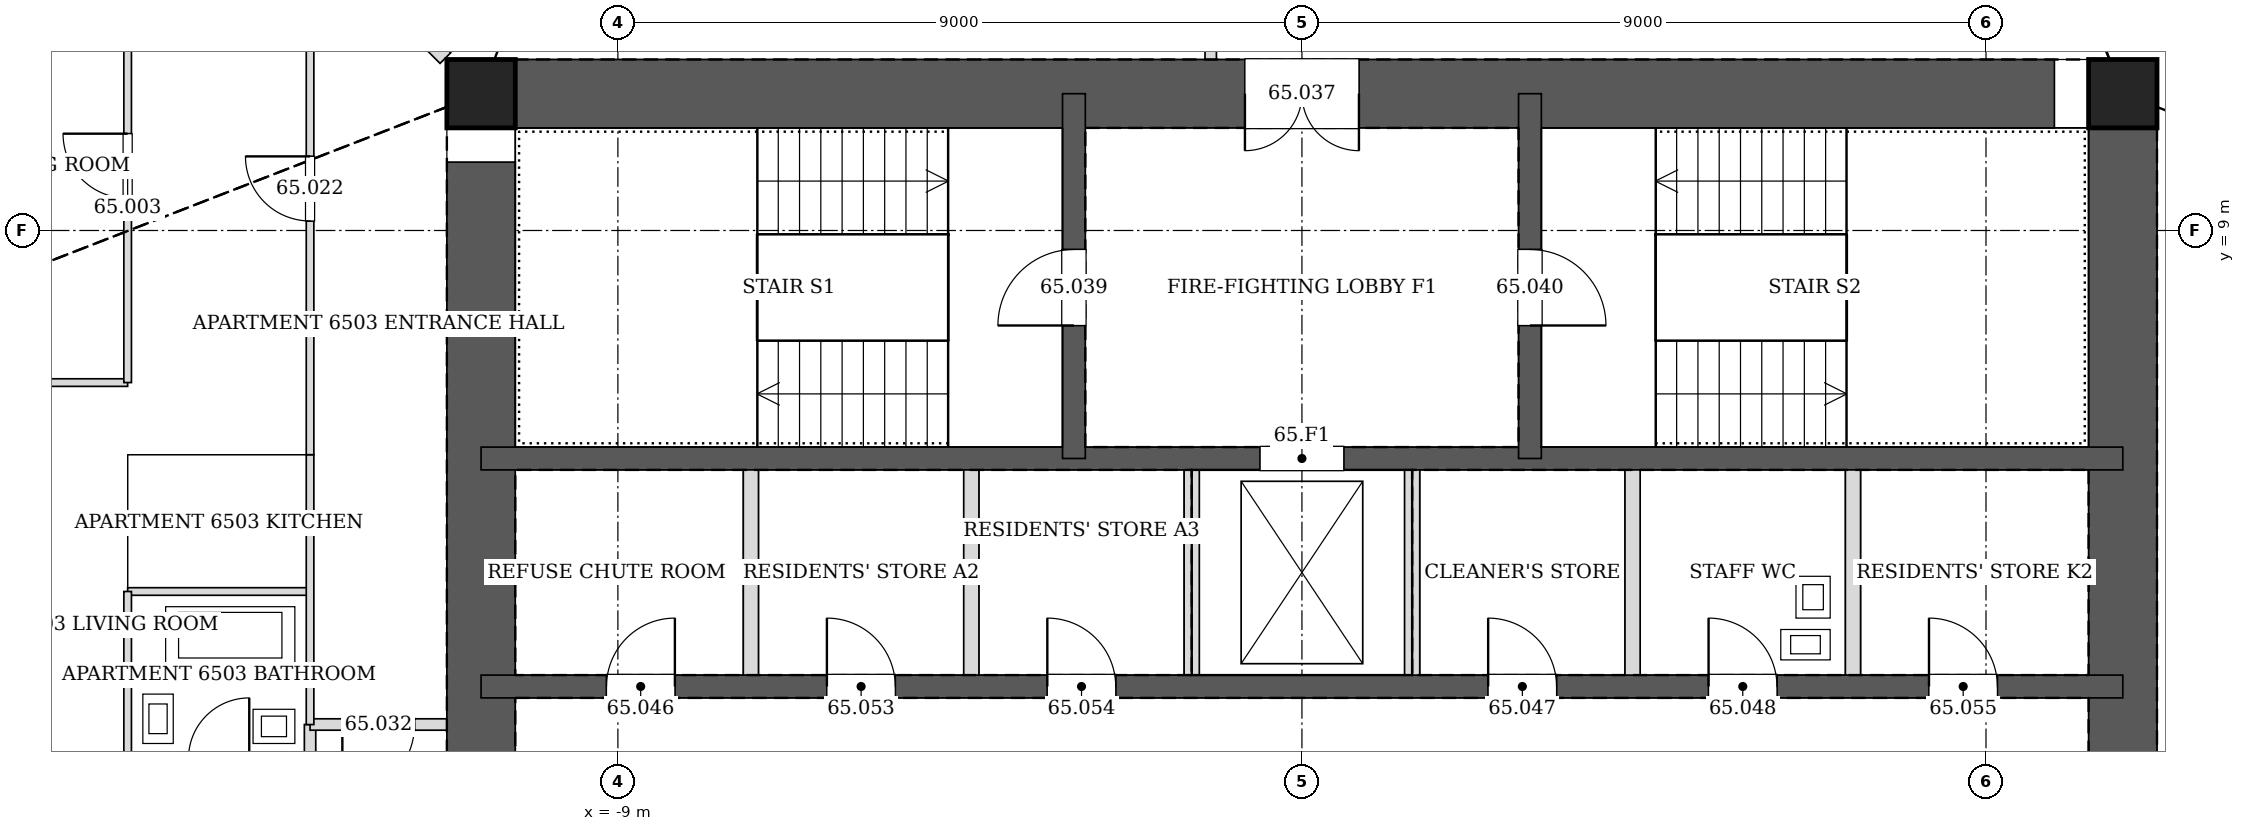
"""IFC4 building model, lengths in metres.
Left out: names, types, materials, properties, quantities, classifications, styles, units other than length and angle.
Written with IfcOpenShell. Run it as: python <this file> out.ifc"""

import sys

from ifc_helpers import new_model, si_unit, direction, frame, frame_2d, origin, origin_2d, place, context, subcontext, project, spatial, rectangle, hollow_rectangle, extrude, element, fill, save


model = new_model("IFC4")
c1 = context("Model", 3, precision=1e-05, world=origin(), true_north=direction((0.0, 1.0)))
c2 = subcontext(c1, "Body", "Model", "MODEL_VIEW")
j1 = project(units=[si_unit("LENGTHUNIT", "METRE"), si_unit("PLANEANGLEUNIT", "RADIAN")], contexts=[c1])
p1 = place(None, origin())
s1 = spatial("IfcSite", under=j1, at=p1, CompositionType="ELEMENT")
p2 = place(p1, origin())
s2 = spatial("IfcBuilding", under=s1, at=p2, CompositionType="ELEMENT")
p3 = place(p2, frame((0.0, 0.0, 270.8)))
s3 = spatial("IfcBuildingStorey", under=s2, at=p3, CompositionType="ELEMENT", Elevation=270.8)
for number, where, z_axis, x_axis in (
    (1, (10.8, 10.8, 0.0), (0.0, 0.0, 1.0), (1.0, 0.0, 0.0)),
    (2, (-10.8, 10.8, 0.0), (0.0, 0.0, 1.0), (1.0, 0.0, 0.0)),
):
    element("IfcColumn", number, at=place(p3, frame(where, z_axis=z_axis, x_axis=x_axis)), inside=s3, PredefinedType="COLUMN", context=c2, shape_type="SweptSolid", body=[
        extrude(hollow_rectangle(XDim=0.9, YDim=0.9, WallThickness=0.04, at=origin_2d()), origin(), (0.0, 0.0, 1.0), 3.4),
    ])
p4 = place(p3, frame((10.8, -10.8, 0.0), z_axis=(0.0, 0.0, 1.0), x_axis=(0.0, 1.0, 0.0)))
e3 = element("IfcWall", 3, at=p4, inside=s3, PredefinedType="SOLIDWALL", context=c2, shape_type="SweptSolid", body=[
    extrude(rectangle(XDim=21.6, YDim=0.9, at=frame_2d((10.8, 0.0))), origin(), (0.0, 0.0, 1.0), 3.4),
])
p5 = place(p4, frame((11.7, 0.0, 0.0)))
e4 = element("IfcOpeningElement", 4, at=p5, cuts=e3, PredefinedType="OPENING", context=c2, shape_type="SweptSolid", body=[
    extrude(rectangle(XDim=1.2, YDim=2.1, at=frame_2d((0.6, 1.05))), frame((0.0, 0.46, 0.0), z_axis=(0.0, -1.0, 0.0), x_axis=(1.0, 0.0, 0.0)), (0.0, 0.0, 1.0), 0.92),
])
p6 = place(p4, frame((8.7, 0.0, 0.0)))
e5 = element("IfcOpeningElement", 5, at=p6, cuts=e3, PredefinedType="OPENING", context=c2, shape_type="SweptSolid", body=[
    extrude(rectangle(XDim=1.2, YDim=2.1, at=frame_2d((0.6, 1.05))), frame((0.0, 0.46, 0.0), z_axis=(0.0, -1.0, 0.0), x_axis=(1.0, 0.0, 0.0)), (0.0, 0.0, 1.0), 0.92),
])
p7 = place(p3, frame((10.8, 10.8, 0.0), z_axis=(0.0, 0.0, 1.0), x_axis=(-1.0, 0.0, 0.0)))
e6 = element("IfcWall", 6, at=p7, inside=s3, PredefinedType="SOLIDWALL", context=c2, shape_type="SweptSolid", body=[
    extrude(rectangle(XDim=21.6, YDim=0.9, at=frame_2d((10.8, 0.0))), origin(), (0.0, 0.0, 1.0), 3.4),
])
p8 = place(p7, frame((10.05, 0.0, 0.0)))
e7 = element("IfcOpeningElement", 7, at=p8, cuts=e6, PredefinedType="OPENING", context=c2, shape_type="SweptSolid", body=[
    extrude(rectangle(XDim=1.5, YDim=2.1, at=frame_2d((0.75, 1.05))), frame((0.0, 0.46, 0.0), z_axis=(0.0, -1.0, 0.0), x_axis=(1.0, 0.0, 0.0)), (0.0, 0.0, 1.0), 0.92),
])
p9 = place(p3, frame((-10.8, 10.8, 0.0), z_axis=(0.0, 0.0, 1.0), x_axis=(0.0, -1.0, 0.0)))
e8 = element("IfcWall", 8, at=p9, inside=s3, PredefinedType="SOLIDWALL", context=c2, shape_type="SweptSolid", body=[
    extrude(rectangle(XDim=21.6, YDim=0.9, at=frame_2d((10.8, 0.0))), origin(), (0.0, 0.0, 1.0), 3.4),
])
p10 = place(p9, frame((8.7, 0.0, 0.0)))
e9 = element("IfcOpeningElement", 9, at=p10, cuts=e8, PredefinedType="OPENING", context=c2, shape_type="SweptSolid", body=[
    extrude(rectangle(XDim=1.2, YDim=2.1, at=frame_2d((0.6, 1.05))), frame((0.0, 0.46, 0.0), z_axis=(0.0, -1.0, 0.0), x_axis=(1.0, 0.0, 0.0)), (0.0, 0.0, 1.0), 0.92),
])
p11 = place(p9, frame((11.7, 0.0, 0.0)))
e10 = element("IfcOpeningElement", 10, at=p11, cuts=e8, PredefinedType="OPENING", context=c2, shape_type="SweptSolid", body=[
    extrude(rectangle(XDim=1.2, YDim=2.1, at=frame_2d((0.6, 1.05))), frame((0.0, 0.46, 0.0), z_axis=(0.0, -1.0, 0.0), x_axis=(1.0, 0.0, 0.0)), (0.0, 0.0, 1.0), 0.92),
])
p12 = place(p3, frame((-10.8, 3.0, 0.0), z_axis=(0.0, 0.0, 1.0), x_axis=(1.0, 0.0, 0.0)))
e11 = element("IfcWall", 11, at=p12, inside=s3, PredefinedType="SOLIDWALL", context=c2, shape_type="SweptSolid", body=[
    extrude(rectangle(XDim=21.6, YDim=0.3, at=frame_2d((10.8, 0.0))), origin(), (0.0, 0.0, 1.0), 3.4),
])
p13 = place(p12, frame((1.65, 0.0, 0.0)))
e12 = element("IfcOpeningElement", 12, at=p13, cuts=e11, PredefinedType="OPENING", context=c2, shape_type="SweptSolid", body=[
    extrude(rectangle(XDim=0.9, YDim=2.1, at=frame_2d((0.45, 1.05))), frame((0.0, 0.16, 0.0), z_axis=(0.0, -1.0, 0.0), x_axis=(1.0, 0.0, 0.0)), (0.0, 0.0, 1.0), 0.32),
])
p14 = place(p12, frame((13.25, 0.0, 0.0)))
e13 = element("IfcOpeningElement", 13, at=p14, cuts=e11, PredefinedType="OPENING", context=c2, shape_type="SweptSolid", body=[
    extrude(rectangle(XDim=0.9, YDim=2.1, at=frame_2d((0.45, 1.05))), frame((0.0, 0.16, 0.0), z_axis=(0.0, -1.0, 0.0), x_axis=(1.0, 0.0, 0.0)), (0.0, 0.0, 1.0), 0.32),
])
p15 = place(p12, frame((16.15, 0.0, 0.0)))
e14 = element("IfcOpeningElement", 14, at=p15, cuts=e11, PredefinedType="OPENING", context=c2, shape_type="SweptSolid", body=[
    extrude(rectangle(XDim=0.9, YDim=2.1, at=frame_2d((0.45, 1.05))), frame((0.0, 0.16, 0.0), z_axis=(0.0, -1.0, 0.0), x_axis=(1.0, 0.0, 0.0)), (0.0, 0.0, 1.0), 0.32),
])
p16 = place(p12, frame((4.55, 0.0, 0.0)))
e15 = element("IfcOpeningElement", 15, at=p16, cuts=e11, PredefinedType="OPENING", context=c2, shape_type="SweptSolid", body=[
    extrude(rectangle(XDim=0.9, YDim=2.1, at=frame_2d((0.45, 1.05))), frame((0.0, 0.16, 0.0), z_axis=(0.0, -1.0, 0.0), x_axis=(1.0, 0.0, 0.0)), (0.0, 0.0, 1.0), 0.32),
])
p17 = place(p12, frame((7.45, 0.0, 0.0)))
e16 = element("IfcOpeningElement", 16, at=p17, cuts=e11, PredefinedType="OPENING", context=c2, shape_type="SweptSolid", body=[
    extrude(rectangle(XDim=0.9, YDim=2.1, at=frame_2d((0.45, 1.05))), frame((0.0, 0.16, 0.0), z_axis=(0.0, -1.0, 0.0), x_axis=(1.0, 0.0, 0.0)), (0.0, 0.0, 1.0), 0.32),
])
p18 = place(p12, frame((19.05, 0.0, 0.0)))
e17 = element("IfcOpeningElement", 17, at=p18, cuts=e11, PredefinedType="OPENING", context=c2, shape_type="SweptSolid", body=[
    extrude(rectangle(XDim=0.9, YDim=2.1, at=frame_2d((0.45, 1.05))), frame((0.0, 0.16, 0.0), z_axis=(0.0, -1.0, 0.0), x_axis=(1.0, 0.0, 0.0)), (0.0, 0.0, 1.0), 0.32),
])
p19 = place(p3, frame((-10.8, 6.0, 0.0), z_axis=(0.0, 0.0, 1.0), x_axis=(1.0, 0.0, 0.0)))
e18 = element("IfcWall", 18, at=p19, inside=s3, PredefinedType="SOLIDWALL", context=c2, shape_type="SweptSolid", body=[
    extrude(rectangle(XDim=21.6, YDim=0.3, at=frame_2d((10.8, 0.0))), origin(), (0.0, 0.0, 1.0), 3.4),
])
p20 = place(p19, frame((10.25, 0.0, 0.0)))
e19 = element("IfcOpeningElement", 19, at=p20, cuts=e18, PredefinedType="OPENING", context=c2, shape_type="SweptSolid", body=[
    extrude(rectangle(XDim=1.1, YDim=2.1, at=frame_2d((0.55, 1.05))), frame((0.0, 0.16, 0.0), z_axis=(0.0, -1.0, 0.0), x_axis=(1.0, 0.0, 0.0)), (0.0, 0.0, 1.0), 0.32),
])
p21 = place(p3, frame((-3.0, 6.0, 0.0), z_axis=(0.0, 0.0, 1.0), x_axis=(0.0, 1.0, 0.0)))
e20 = element("IfcWall", 20, at=p21, inside=s3, PredefinedType="SOLIDWALL", context=c2, shape_type="SweptSolid", body=[
    extrude(rectangle(XDim=4.8, YDim=0.3, at=frame_2d((2.4, 0.0))), origin(), (0.0, 0.0, 1.0), 3.4),
])
p22 = place(p21, frame((1.75, 0.0, 0.0)))
e21 = element("IfcOpeningElement", 21, at=p22, cuts=e20, PredefinedType="OPENING", context=c2, shape_type="SweptSolid", body=[
    extrude(rectangle(XDim=1.0, YDim=2.1, at=frame_2d((0.5, 1.05))), frame((0.0, 0.16, 0.0), z_axis=(0.0, -1.0, 0.0), x_axis=(1.0, 0.0, 0.0)), (0.0, 0.0, 1.0), 0.32),
])
p23 = place(p3, frame((3.0, 6.0, 0.0), z_axis=(0.0, 0.0, 1.0), x_axis=(0.0, 1.0, 0.0)))
e22 = element("IfcWall", 22, at=p23, inside=s3, PredefinedType="SOLIDWALL", context=c2, shape_type="SweptSolid", body=[
    extrude(rectangle(XDim=4.8, YDim=0.3, at=frame_2d((2.4, 0.0))), origin(), (0.0, 0.0, 1.0), 3.4),
])
p24 = place(p23, frame((1.75, 0.0, 0.0)))
e23 = element("IfcOpeningElement", 23, at=p24, cuts=e22, PredefinedType="OPENING", context=c2, shape_type="SweptSolid", body=[
    extrude(rectangle(XDim=1.0, YDim=2.1, at=frame_2d((0.5, 1.05))), frame((0.0, 0.16, 0.0), z_axis=(0.0, -1.0, 0.0), x_axis=(1.0, 0.0, 0.0)), (0.0, 0.0, 1.0), 0.32),
])
p25 = place(p3, frame((-1.2, 13.05, 0.0), z_axis=(0.0, 0.0, 1.0), x_axis=(0.0, -1.0, 0.0)))
e24 = element("IfcWall", 24, at=p25, inside=s3, PredefinedType="PARTITIONING", context=c2, shape_type="SweptSolid", body=[
    extrude(rectangle(XDim=1.8, YDim=0.15, at=frame_2d((0.9, 0.0))), origin(), (0.0, 0.0, 1.0), 3.2),
])
p26 = place(p25, frame((0.425, 0.0, 0.0)))
e25 = element("IfcOpeningElement", 25, at=p26, cuts=e24, PredefinedType="OPENING", context=c2, shape_type="SweptSolid", body=[
    extrude(rectangle(XDim=0.95, YDim=2.1, at=frame_2d((0.475, 1.05))), frame((0.0, 0.085, 0.0), z_axis=(0.0, -1.0, 0.0), x_axis=(1.0, 0.0, 0.0)), (0.0, 0.0, 1.0), 0.17),
])
p27 = place(p3, frame((-13.05, 2.5, 0.0), z_axis=(0.0, 0.0, 1.0), x_axis=(0.0, -1.0, 0.0)))
e26 = element("IfcWall", 26, at=p27, inside=s3, PredefinedType="PARTITIONING", context=c2, shape_type="SweptSolid", body=[
    extrude(rectangle(XDim=0.451, YDim=0.15, at=frame_2d((0.226, 0.0))), origin(), (0.0, 0.0, 1.0), 3.2),
])
p28 = place(p3, frame((-11.25, 2.5, 0.0), z_axis=(0.0, 0.0, 1.0), x_axis=(-1.0, 0.0, 0.0)))
e27 = element("IfcWall", 27, at=p28, inside=s3, PredefinedType="PARTITIONING", context=c2, shape_type="SweptSolid", body=[
    extrude(rectangle(XDim=1.8, YDim=0.15, at=frame_2d((0.9, 0.0))), origin(), (0.0, 0.0, 1.0), 3.2),
])
p29 = place(p28, frame((0.425, 0.0, 0.0)))
e28 = element("IfcOpeningElement", 28, at=p29, cuts=e27, PredefinedType="OPENING", context=c2, shape_type="SweptSolid", body=[
    extrude(rectangle(XDim=0.95, YDim=2.1, at=frame_2d((0.475, 1.05))), frame((0.0, 0.085, 0.0), z_axis=(0.0, -1.0, 0.0), x_axis=(1.0, 0.0, 0.0)), (0.0, 0.0, 1.0), 0.17),
])
p30 = place(p3, frame((-18.198, 6.999, 0.0), z_axis=(0.0, 0.0, 1.0), x_axis=(1.0, 0.0, 0.0)))
e29 = element("IfcWall", 29, at=p30, inside=s3, PredefinedType="PARTITIONING", context=c2, shape_type="SweptSolid", body=[
    extrude(rectangle(XDim=2.748, YDim=0.1, at=frame_2d((1.374, 0.0))), origin(), (0.0, 0.0, 1.0), 2.591),
])
p31 = place(p3, frame((-15.45, 6.999, 0.0), z_axis=(0.0, 0.0, 1.0), x_axis=(0.0, 1.0, 0.0)))
e30 = element("IfcWall", 30, at=p31, inside=s3, PredefinedType="PARTITIONING", context=c2, shape_type="SweptSolid", body=[
    extrude(rectangle(XDim=6.314, YDim=0.1, at=frame_2d((3.157, 0.0))), origin(), (0.0, 0.0, 1.0), 2.349),
])
p32 = place(p31, frame((2.425, 0.0, 0.0)))
e31 = element("IfcOpeningElement", 31, at=p32, cuts=e30, PredefinedType="OPENING", context=c2, shape_type="SweptSolid", body=[
    extrude(rectangle(XDim=0.85, YDim=2.1, at=frame_2d((0.425, 1.05))), frame((0.0, 0.06, 0.0), z_axis=(0.0, -1.0, 0.0), x_axis=(1.0, 0.0, 0.0)), (0.0, 0.0, 1.0), 0.12),
])
p33 = place(p3, frame((-13.586, 13.586, 0.0), z_axis=(0.0, 0.0, 1.0), x_axis=(0.707106781187, -0.707106781187, 0.0)))
e32 = element("IfcWall", 32, at=p33, inside=s3, PredefinedType="PARTITIONING", context=c2, shape_type="SweptSolid", body=[
    extrude(rectangle(XDim=3.277, YDim=0.2, at=frame_2d((1.638, 0.0))), origin(), (0.0, 0.0, 1.0), 2.591),
])
p34 = place(p3, frame((-15.45, 4.25, 0.0), z_axis=(0.0, 0.0, 1.0), x_axis=(1.0, 0.0, 0.0)))
e33 = element("IfcWall", 33, at=p34, inside=s3, PredefinedType="PARTITIONING", context=c2, shape_type="SweptSolid", body=[
    extrude(rectangle(XDim=2.4, YDim=0.1, at=frame_2d((1.2, 0.0))), origin(), (0.0, 0.0, 1.0), 2.591),
])
p35 = place(p3, frame((-13.05, 6.05, 0.0), z_axis=(0.0, 0.0, 1.0), x_axis=(0.0, -1.0, 0.0)))
e34 = element("IfcWall", 34, at=p35, inside=s3, PredefinedType="PARTITIONING", context=c2, shape_type="SweptSolid", body=[
    extrude(rectangle(XDim=3.551, YDim=0.1, at=frame_2d((1.775, 0.0))), origin(), (0.0, 0.0, 1.0), 3.2),
])
p36 = place(p3, frame((-15.45, 4.25, 0.0), z_axis=(0.0, 0.0, 1.0), x_axis=(0.0, -1.0, 0.0)))
e35 = element("IfcWall", 35, at=p36, inside=s3, PredefinedType="PARTITIONING", context=c2, shape_type="SweptSolid", body=[
    extrude(rectangle(XDim=2.2, YDim=0.1, at=frame_2d((1.1, 0.0))), origin(), (0.0, 0.0, 1.0), 3.2),
])
p37 = place(p3, frame((-13.05, 6.05, 0.0), z_axis=(0.0, 0.0, 1.0), x_axis=(0.0, 1.0, 0.0)))
e36 = element("IfcWall", 36, at=p37, inside=s3, PredefinedType="PARTITIONING", context=c2, shape_type="SweptSolid", body=[
    extrude(rectangle(XDim=7.0, YDim=0.1, at=frame_2d((3.5, 0.0))), origin(), (0.0, 0.0, 1.0), 2.349),
])
p38 = place(p37, frame((3.075, 0.0, 0.0)))
e37 = element("IfcOpeningElement", 37, at=p38, cuts=e36, PredefinedType="OPENING", context=c2, shape_type="SweptSolid", body=[
    extrude(rectangle(XDim=0.85, YDim=2.1, at=frame_2d((0.425, 1.05))), frame((0.0, 0.06, 0.0), z_axis=(0.0, -1.0, 0.0), x_axis=(1.0, 0.0, 0.0)), (0.0, 0.0, 1.0), 0.12),
])
for number, where, z_axis, x_axis in (
    (38, (-7.25, 3.15, 0.0), (0.0, 0.0, 1.0), (0.0, 1.0, 0.0)),
    (39, (-4.35, 3.15, 0.0), (0.0, 0.0, 1.0), (0.0, 1.0, 0.0)),
    (40, (-1.45, 3.15, 0.0), (0.0, 0.0, 1.0), (0.0, 1.0, 0.0)),
    (41, (1.45, 3.15, 0.0), (0.0, 0.0, 1.0), (0.0, 1.0, 0.0)),
    (42, (4.35, 3.15, 0.0), (0.0, 0.0, 1.0), (0.0, 1.0, 0.0)),
    (43, (7.25, 3.15, 0.0), (0.0, 0.0, 1.0), (0.0, 1.0, 0.0)),
):
    element("IfcWall", number, at=place(p3, frame(where, z_axis=z_axis, x_axis=x_axis)), inside=s3, PredefinedType="PARTITIONING", context=c2, shape_type="SweptSolid", body=[
        extrude(rectangle(XDim=2.7, YDim=0.2, at=frame_2d((1.35, 0.0))), origin(), (0.0, 0.0, 1.0), 3.2),
    ])
p39 = place(p32, origin())
e44 = element("IfcDoor", 44, at=p39, inside=s3, OperationType="SINGLE_SWING_RIGHT", PredefinedType="DOOR", context=c2, shape_type="SweptSolid", body=[
    extrude(rectangle(XDim=0.85, YDim=2.1, at=frame_2d((0.425, 1.05))), frame((0.0, 0.025, 0.0), z_axis=(0.0, -1.0, 0.0), x_axis=(1.0, 0.0, 0.0)), (0.0, 0.0, 1.0), 0.05),
])
fill(e31, e44)
p40 = place(p38, origin())
e45 = element("IfcDoor", 45, at=p40, inside=s3, OperationType="SINGLE_SWING_RIGHT", PredefinedType="DOOR", context=c2, shape_type="SweptSolid", body=[
    extrude(rectangle(XDim=0.85, YDim=2.1, at=frame_2d((0.425, 1.05))), frame((0.0, 0.025, 0.0), z_axis=(0.0, -1.0, 0.0), x_axis=(1.0, 0.0, 0.0)), (0.0, 0.0, 1.0), 0.05),
])
fill(e37, e45)
p41 = place(p29, origin())
e46 = element("IfcDoor", 46, at=p41, inside=s3, OperationType="SINGLE_SWING_RIGHT", PredefinedType="DOOR", context=c2, shape_type="SweptSolid", body=[
    extrude(rectangle(XDim=0.95, YDim=2.1, at=frame_2d((0.475, 1.05))), frame((0.0, 0.025, 0.0), z_axis=(0.0, -1.0, 0.0), x_axis=(1.0, 0.0, 0.0)), (0.0, 0.0, 1.0), 0.05),
])
fill(e28, e46)
p42 = place(p8, origin())
e47 = element("IfcDoor", 47, at=p42, inside=s3, OperationType="DOUBLE_DOOR_SINGLE_SWING", PredefinedType="DOOR", context=c2, shape_type="SweptSolid", body=[
    extrude(rectangle(XDim=1.5, YDim=2.1, at=frame_2d((0.75, 1.05))), frame((0.0, 0.025, 0.0), z_axis=(0.0, -1.0, 0.0), x_axis=(1.0, 0.0, 0.0)), (0.0, 0.0, 1.0), 0.05),
])
fill(e7, e47)
p43 = place(p22, origin())
e48 = element("IfcDoor", 48, at=p43, inside=s3, OperationType="SINGLE_SWING_LEFT", PredefinedType="DOOR", context=c2, shape_type="SweptSolid", body=[
    extrude(rectangle(XDim=1.0, YDim=2.1, at=frame_2d((0.5, 1.05))), frame((0.0, 0.025, 0.0), z_axis=(0.0, -1.0, 0.0), x_axis=(1.0, 0.0, 0.0)), (0.0, 0.0, 1.0), 0.05),
])
fill(e21, e48)
p44 = place(p24, frame((1.0, 0.0, 0.0), z_axis=(0.0, 0.0, 1.0), x_axis=(-1.0, 0.0, 0.0)))
e49 = element("IfcDoor", 49, at=p44, inside=s3, OperationType="SINGLE_SWING_RIGHT", PredefinedType="DOOR", context=c2, shape_type="SweptSolid", body=[
    extrude(rectangle(XDim=1.0, YDim=2.1, at=frame_2d((0.5, 1.05))), frame((0.0, 0.025, 0.0), z_axis=(0.0, -1.0, 0.0), x_axis=(1.0, 0.0, 0.0)), (0.0, 0.0, 1.0), 0.05),
])
fill(e23, e49)
p45 = place(p13, origin())
e50 = element("IfcDoor", 50, at=p45, inside=s3, OperationType="SINGLE_SWING_RIGHT", PredefinedType="DOOR", context=c2, shape_type="SweptSolid", body=[
    extrude(rectangle(XDim=0.9, YDim=2.1, at=frame_2d((0.45, 1.05))), frame((0.0, 0.025, 0.0), z_axis=(0.0, -1.0, 0.0), x_axis=(1.0, 0.0, 0.0)), (0.0, 0.0, 1.0), 0.05),
])
fill(e12, e50)
p46 = place(p14, origin())
e51 = element("IfcDoor", 51, at=p46, inside=s3, OperationType="SINGLE_SWING_LEFT", PredefinedType="DOOR", context=c2, shape_type="SweptSolid", body=[
    extrude(rectangle(XDim=0.9, YDim=2.1, at=frame_2d((0.45, 1.05))), frame((0.0, 0.025, 0.0), z_axis=(0.0, -1.0, 0.0), x_axis=(1.0, 0.0, 0.0)), (0.0, 0.0, 1.0), 0.05),
])
fill(e13, e51)
p47 = place(p15, origin())
e52 = element("IfcDoor", 52, at=p47, inside=s3, OperationType="SINGLE_SWING_LEFT", PredefinedType="DOOR", context=c2, shape_type="SweptSolid", body=[
    extrude(rectangle(XDim=0.9, YDim=2.1, at=frame_2d((0.45, 1.05))), frame((0.0, 0.025, 0.0), z_axis=(0.0, -1.0, 0.0), x_axis=(1.0, 0.0, 0.0)), (0.0, 0.0, 1.0), 0.05),
])
fill(e14, e52)
p48 = place(p16, origin())
e53 = element("IfcDoor", 53, at=p48, inside=s3, OperationType="SINGLE_SWING_LEFT", PredefinedType="DOOR", context=c2, shape_type="SweptSolid", body=[
    extrude(rectangle(XDim=0.9, YDim=2.1, at=frame_2d((0.45, 1.05))), frame((0.0, 0.025, 0.0), z_axis=(0.0, -1.0, 0.0), x_axis=(1.0, 0.0, 0.0)), (0.0, 0.0, 1.0), 0.05),
])
fill(e15, e53)
p49 = place(p17, origin())
e54 = element("IfcDoor", 54, at=p49, inside=s3, OperationType="SINGLE_SWING_LEFT", PredefinedType="DOOR", context=c2, shape_type="SweptSolid", body=[
    extrude(rectangle(XDim=0.9, YDim=2.1, at=frame_2d((0.45, 1.05))), frame((0.0, 0.025, 0.0), z_axis=(0.0, -1.0, 0.0), x_axis=(1.0, 0.0, 0.0)), (0.0, 0.0, 1.0), 0.05),
])
fill(e16, e54)
p50 = place(p18, origin())
e55 = element("IfcDoor", 55, at=p50, inside=s3, OperationType="SINGLE_SWING_LEFT", PredefinedType="DOOR", context=c2, shape_type="SweptSolid", body=[
    extrude(rectangle(XDim=0.9, YDim=2.1, at=frame_2d((0.45, 1.05))), frame((0.0, 0.025, 0.0), z_axis=(0.0, -1.0, 0.0), x_axis=(1.0, 0.0, 0.0)), (0.0, 0.0, 1.0), 0.05),
])
fill(e17, e55)
p51 = place(p20, origin())
e56 = element("IfcDoor", 56, at=p51, inside=s3, OperationType="DOUBLE_DOOR_SLIDING", PredefinedType="DOOR", context=c2, shape_type="SweptSolid", body=[
    extrude(rectangle(XDim=1.1, YDim=2.1, at=frame_2d((0.55, 1.05))), frame((0.0, 0.025, 0.0), z_axis=(0.0, -1.0, 0.0), x_axis=(1.0, 0.0, 0.0)), (0.0, 0.0, 1.0), 0.05),
])
fill(e19, e56)
save(model, sys.argv[1])
